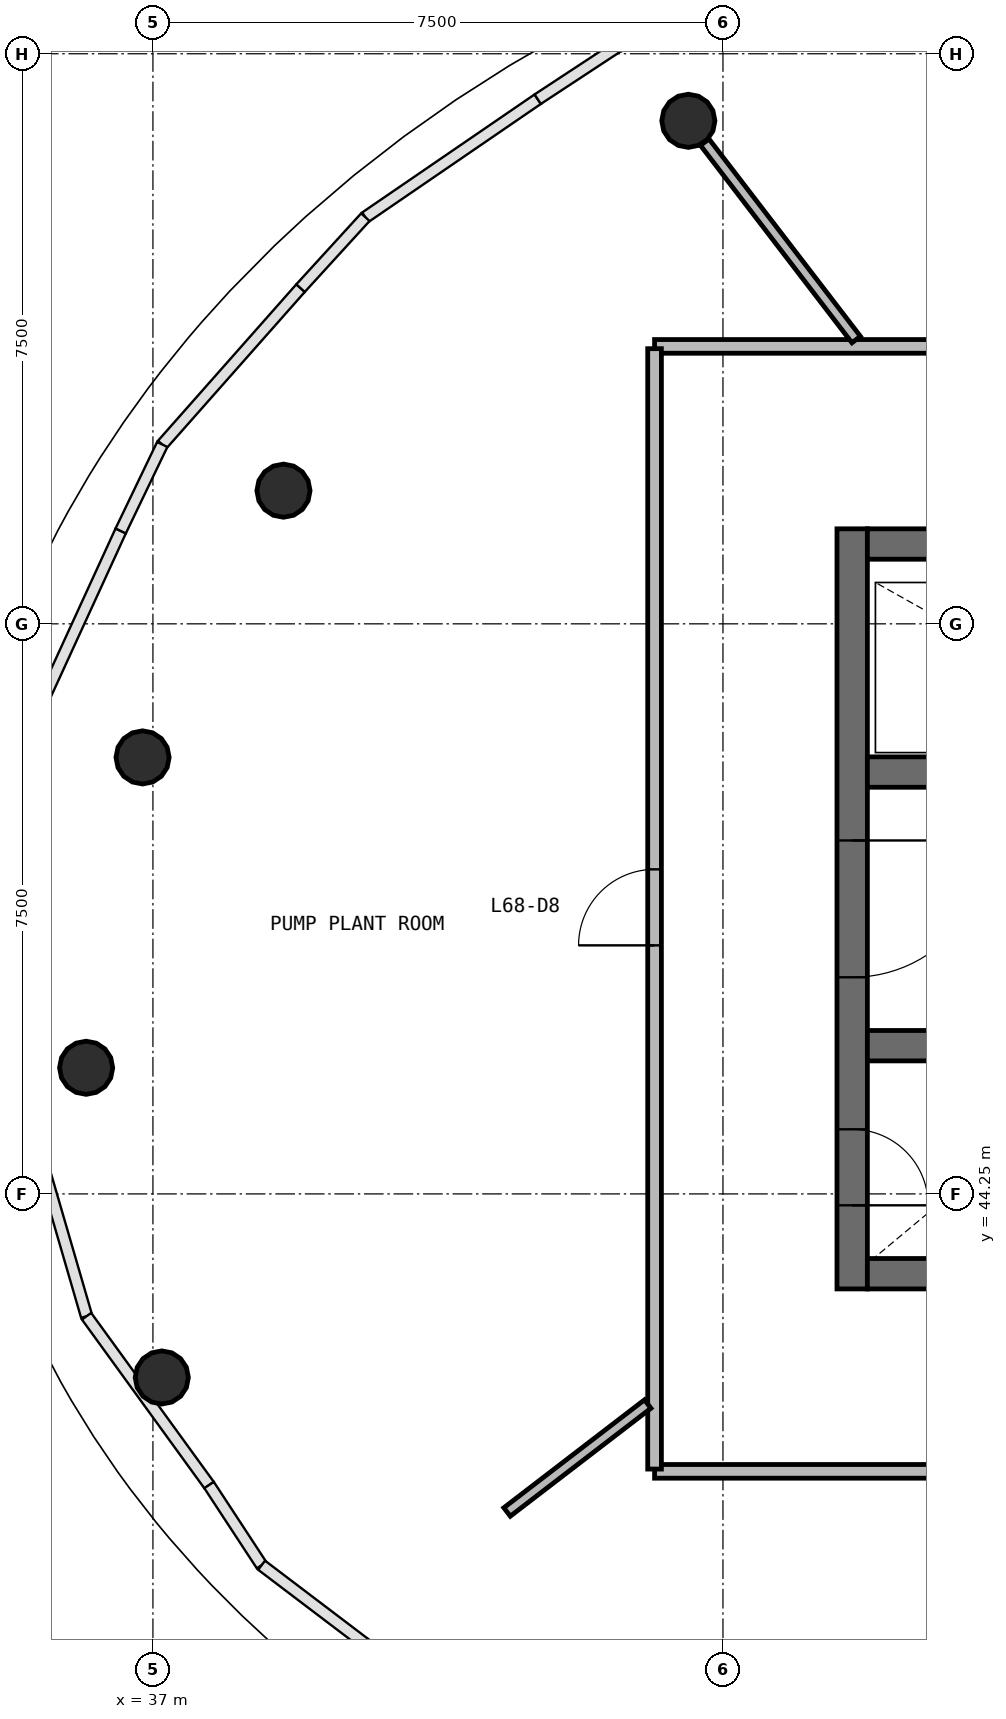
"""IFC4 building model, lengths in metres.
Left out: names, types, materials, properties, quantities, classifications, styles, units other than length and angle.
Written with IfcOpenShell. Run it as: python <this file> out.ifc"""

import sys

from ifc_helpers import new_model, si_unit, direction, frame, frame_2d, origin, origin_2d, place, context, subcontext, project, spatial, rectangle, circle, extrude, source, transform, mapped, element, fill, save


model = new_model("IFC4")
c1 = context("Model", 3, precision=1e-05, world=origin(), true_north=direction((0.0, 1.0)))
c2 = subcontext(c1, "Body", "Model", "MODEL_VIEW")
j1 = project(units=[si_unit("LENGTHUNIT", "METRE"), si_unit("PLANEANGLEUNIT", "RADIAN")], contexts=[c1])
p1 = place(None, origin())
s1 = spatial("IfcSite", under=j1, at=p1, CompositionType="ELEMENT")
p2 = place(p1, origin())
s2 = spatial("IfcBuilding", under=s1, at=p2, CompositionType="ELEMENT")
p3 = place(p2, frame((0.0, 0.0, 276.6)))
s3 = spatial("IfcBuildingStorey", under=s2, at=p3, CompositionType="ELEMENT", Elevation=276.6)
p4 = place(p3, frame((46.2, 53.0, 0.0), z_axis=(0.0, 0.0, 1.0), x_axis=(0.0, -1.0, 0.0)))
e1 = element("IfcWall", 1, at=p4, inside=s3, PredefinedType="SHEAR", context=c2, shape_type="SweptSolid", body=[
    extrude(rectangle(XDim=10.0, YDim=0.4, at=frame_2d((5.0, 0.0))), origin(), (0.0, 0.0, 1.0), 3.5),
])
p5 = place(p4, frame((4.1, 0.0, 0.0)))
e2 = element("IfcOpeningElement", 2, at=p5, cuts=e1, PredefinedType="OPENING", context=c2, shape_type="SweptSolid", body=[
    extrude(rectangle(XDim=1.8, YDim=2.1, at=frame_2d((0.9, 1.05))), frame((0.0, 0.21, 0.0), z_axis=(0.0, -1.0, 0.0), x_axis=(1.0, 0.0, 0.0)), (0.0, 0.0, 1.0), 0.42),
])
p6 = place(p4, frame((7.9, 0.0, 0.0)))
e3 = element("IfcOpeningElement", 3, at=p6, cuts=e1, PredefinedType="OPENING", context=c2, shape_type="SweptSolid", body=[
    extrude(rectangle(XDim=1.0, YDim=2.1, at=frame_2d((0.5, 1.05))), frame((0.0, 0.21, 0.0), z_axis=(0.0, -1.0, 0.0), x_axis=(1.0, 0.0, 0.0)), (0.0, 0.0, 1.0), 0.42),
])
p7 = place(p3, frame((46.4, 43.2, 0.0), z_axis=(0.0, 0.0, 1.0), x_axis=(1.0, 0.0, 0.0)))
e4 = element("IfcWall", 4, at=p7, inside=s3, PredefinedType="SHEAR", context=c2, shape_type="SweptSolid", body=[
    extrude(rectangle(XDim=11.2, YDim=0.4, at=frame_2d((5.6, 0.0))), origin(), (0.0, 0.0, 1.0), 3.5),
])
p8 = place(p3, frame((57.6, 52.8, 0.0), z_axis=(0.0, 0.0, 1.0), x_axis=(-1.0, 0.0, 0.0)))
e5 = element("IfcWall", 5, at=p8, inside=s3, PredefinedType="SHEAR", context=c2, shape_type="SweptSolid", body=[
    extrude(rectangle(XDim=11.2, YDim=0.4, at=frame_2d((5.6, 0.0))), origin(), (0.0, 0.0, 1.0), 3.5),
])
p9 = place(p8, frame((6.1, 0.0, 0.0)))
e6 = element("IfcOpeningElement", 6, at=p9, cuts=e5, PredefinedType="OPENING", context=c2, shape_type="SweptSolid", body=[
    extrude(rectangle(XDim=1.0, YDim=2.1, at=frame_2d((0.5, 1.05))), frame((0.0, 0.21, 0.0), z_axis=(0.0, -1.0, 0.0), x_axis=(1.0, 0.0, 0.0)), (0.0, 0.0, 1.0), 0.42),
])
p10 = place(p3, frame((46.4, 49.8, 0.0), z_axis=(0.0, 0.0, 1.0), x_axis=(1.0, 0.0, 0.0)))
e7 = element("IfcWall", 7, at=p10, inside=s3, PredefinedType="SHEAR", context=c2, shape_type="SweptSolid", body=[
    extrude(rectangle(XDim=11.2, YDim=0.4, at=frame_2d((5.6, 0.0))), origin(), (0.0, 0.0, 1.0), 3.5),
])
p11 = place(p10, frame((8.95, 0.0, 0.0)))
e8 = element("IfcOpeningElement", 8, at=p11, cuts=e7, PredefinedType="OPENING", context=c2, shape_type="SweptSolid", body=[
    extrude(rectangle(XDim=1.1, YDim=2.1, at=frame_2d((0.55, 1.05))), frame((0.0, 0.21, 0.0), z_axis=(0.0, -1.0, 0.0), x_axis=(1.0, 0.0, 0.0)), (0.0, 0.0, 1.0), 0.42),
])
p12 = place(p10, frame((5.65, 0.0, 0.0)))
e9 = element("IfcOpeningElement", 9, at=p12, cuts=e7, PredefinedType="OPENING", context=c2, shape_type="SweptSolid", body=[
    extrude(rectangle(XDim=0.9, YDim=2.1, at=frame_2d((0.45, 1.05))), frame((0.0, 0.21, 0.0), z_axis=(0.0, -1.0, 0.0), x_axis=(1.0, 0.0, 0.0)), (0.0, 0.0, 1.0), 0.42),
])
p13 = place(p3, frame((46.4, 46.2, 0.0), z_axis=(0.0, 0.0, 1.0), x_axis=(1.0, 0.0, 0.0)))
e10 = element("IfcWall", 10, at=p13, inside=s3, PredefinedType="SHEAR", context=c2, shape_type="SweptSolid", body=[
    extrude(rectangle(XDim=11.2, YDim=0.4, at=frame_2d((5.6, 0.0))), origin(), (0.0, 0.0, 1.0), 3.5),
])
p14 = place(p13, frame((5.65, 0.0, 0.0)))
e11 = element("IfcOpeningElement", 11, at=p14, cuts=e10, PredefinedType="OPENING", context=c2, shape_type="SweptSolid", body=[
    extrude(rectangle(XDim=0.9, YDim=2.1, at=frame_2d((0.45, 1.05))), frame((0.0, 0.21, 0.0), z_axis=(0.0, -1.0, 0.0), x_axis=(1.0, 0.0, 0.0)), (0.0, 0.0, 1.0), 0.42),
])
m1 = source(origin(), c2, "Body", "SweptSolid", [
    extrude(circle(Radius=0.35, at=origin_2d()), origin(), (0.0, 0.0, 1.0), 3.747),
])
p15 = place(p3, frame((47.086, 59.863, 0.128), z_axis=(0.136577604612, -0.329715018769, 0.934149112464), x_axis=(0.923874408562, 0.38269580244, 0.0)))
e12 = element("IfcColumn", 12, at=p15, inside=s3, PredefinedType="COLUMN", context=c2, shape_type="MappedRepresentation", body=[
    mapped(m1, transform((0.0, 0.0, 0.0), scale=1.0)),
])
m2 = source(origin(), c2, "Body", "SweptSolid", [
    extrude(circle(Radius=0.35, at=origin_2d()), origin(), (0.0, 0.0, 1.0), 3.739),
])
p16 = place(p3, frame((44.044, 58.368, 0.126), z_axis=(0.21405361087, -0.278961874812, 0.936141722217), x_axis=(0.793355214176, 0.608758986907, 0.0)))
e13 = element("IfcColumn", 13, at=p16, inside=s3, PredefinedType="COLUMN", context=c2, shape_type="MappedRepresentation", body=[
    mapped(m2, transform((0.0, 0.0, 0.0), scale=1.0)),
])
m3 = source(origin(), c2, "Body", "SweptSolid", [
    extrude(circle(Radius=0.35, at=origin_2d()), origin(), (0.0, 0.0, 1.0), 3.807),
])
p17 = place(p3, frame((38.718, 53.502, 0.141), z_axis=(0.363645996148, -0.150626775693, 0.919278610613), x_axis=(0.382682721486, 0.923879826967, 0.0)))
e14 = element("IfcColumn", 14, at=p17, inside=s3, PredefinedType="COLUMN", context=c2, shape_type="MappedRepresentation", body=[
    mapped(m3, transform((0.0, 0.0, 0.0), scale=1.0)),
])
m4 = source(origin(), c2, "Body", "SweptSolid", [
    extrude(circle(Radius=0.35, at=origin_2d()), origin(), (0.0, 0.0, 1.0), 3.898),
])
p18 = place(p3, frame((36.864, 49.993, 0.157), z_axis=(0.436578084577, -0.057429651923, 0.897831504876), x_axis=(0.130421400619, 0.991458651816, 0.0)))
e15 = element("IfcColumn", 15, at=p18, inside=s3, PredefinedType="COLUMN", context=c2, shape_type="MappedRepresentation", body=[
    mapped(m4, transform((0.0, 0.0, 0.0), scale=1.0)),
])
m5 = source(origin(), c2, "Body", "SweptSolid", [
    extrude(circle(Radius=0.35, at=origin_2d()), origin(), (0.0, 0.0, 1.0), 4.014),
])
p19 = place(p3, frame((36.121, 45.909, 0.174), z_axis=(0.48560488086, 0.063916184068, 0.871838643958), x_axis=(-0.13049626669, 0.991448800685, 0.0)))
e16 = element("IfcColumn", 16, at=p19, inside=s3, PredefinedType="COLUMN", context=c2, shape_type="MappedRepresentation", body=[
    mapped(m5, transform((0.0, 0.0, 0.0), scale=1.0)),
])
m6 = source(origin(), c2, "Body", "SweptSolid", [
    extrude(circle(Radius=0.35, at=origin_2d()), origin(), (0.0, 0.0, 1.0), 4.07),
])
p20 = place(p3, frame((37.117, 41.835, 0.181), z_axis=(0.471365631204, 0.195217483001, 0.86006079788), x_axis=(-0.382635660379, 0.923899318869, 0.0)))
e17 = element("IfcColumn", 17, at=p20, inside=s3, PredefinedType="COLUMN", context=c2, shape_type="MappedRepresentation", body=[
    mapped(m6, transform((0.0, 0.0, 0.0), scale=1.0)),
])
p21 = place(p3, frame((43.6, 55.4, 0.0), z_axis=(0.0, 0.0, 1.0), x_axis=(1.0, 0.0, 0.0)))
e18 = element("IfcWall", 18, at=p21, inside=s3, PredefinedType="PARTITIONING", context=c2, shape_type="SweptSolid", body=[
    extrude(rectangle(XDim=16.8, YDim=0.18, at=frame_2d((8.4, 0.0))), origin(), (0.0, 0.0, 1.0), 2.62),
])
p22 = place(p21, frame((7.95, 0.0, 0.0)))
e19 = element("IfcOpeningElement", 19, at=p22, cuts=e18, PredefinedType="OPENING", context=c2, shape_type="SweptSolid", body=[
    extrude(rectangle(XDim=1.0, YDim=2.1, at=frame_2d((0.5, 1.05))), frame((0.0, 0.1, 0.0), z_axis=(0.0, -1.0, 0.0), x_axis=(1.0, 0.0, 0.0)), (0.0, 0.0, 1.0), 0.2),
])
p23 = place(p3, frame((60.4, 40.6, 0.0), z_axis=(0.0, 0.0, 1.0), x_axis=(-1.0, 0.0, 0.0)))
e20 = element("IfcWall", 20, at=p23, inside=s3, PredefinedType="PARTITIONING", context=c2, shape_type="SweptSolid", body=[
    extrude(rectangle(XDim=16.8, YDim=0.18, at=frame_2d((8.4, 0.0))), origin(), (0.0, 0.0, 1.0), 2.62),
])
p24 = place(p23, frame((7.95, 0.0, 0.0)))
e21 = element("IfcOpeningElement", 21, at=p24, cuts=e20, PredefinedType="OPENING", context=c2, shape_type="SweptSolid", body=[
    extrude(rectangle(XDim=1.0, YDim=2.1, at=frame_2d((0.5, 1.05))), frame((0.0, 0.1, 0.0), z_axis=(0.0, -1.0, 0.0), x_axis=(1.0, 0.0, 0.0)), (0.0, 0.0, 1.0), 0.2),
])
p25 = place(p3, frame((43.6, 40.63, 0.0), z_axis=(0.0, 0.0, 1.0), x_axis=(0.0, 1.0, 0.0)))
e22 = element("IfcWall", 22, at=p25, inside=s3, PredefinedType="PARTITIONING", context=c2, shape_type="SweptSolid", body=[
    extrude(rectangle(XDim=14.74, YDim=0.18, at=frame_2d((7.37, 0.0))), origin(), (0.0, 0.0, 1.0), 2.62),
])
p26 = place(p25, frame((6.89, 0.0, 0.0)))
e23 = element("IfcOpeningElement", 23, at=p26, cuts=e22, PredefinedType="OPENING", context=c2, shape_type="SweptSolid", body=[
    extrude(rectangle(XDim=1.0, YDim=2.1, at=frame_2d((0.5, 1.05))), frame((0.0, 0.1, 0.0), z_axis=(0.0, -1.0, 0.0), x_axis=(1.0, 0.0, 0.0)), (0.0, 0.0, 1.0), 0.2),
])
p27 = place(p3, frame((43.51, 41.485, 0.0), z_axis=(0.0, 0.0, 1.0), x_axis=(-0.793370454613, -0.608739124542, 0.0)))
e24 = element("IfcWall", 24, at=p27, inside=s3, PredefinedType="PARTITIONING", context=c2, shape_type="SweptSolid", body=[
    extrude(rectangle(XDim=2.333, YDim=0.14, at=frame_2d((1.166, 0.0))), origin(), (0.0, 0.0, 1.0), 2.62),
])
p28 = place(p3, frame((46.253, 55.49, 0.0), z_axis=(0.0, 0.0, 1.0), x_axis=(-0.608736894437, 0.793372165728, 0.0)))
e25 = element("IfcWall", 25, at=p28, inside=s3, PredefinedType="PARTITIONING", context=c2, shape_type="SweptSolid", body=[
    extrude(rectangle(XDim=3.273, YDim=0.14, at=frame_2d((1.636, 0.0))), origin(), (0.0, 0.0, 1.0), 2.62),
])
m7 = source(origin(), c2, "Body", "SweptSolid", [
    extrude(rectangle(XDim=1.8, YDim=2.1, at=frame_2d((0.9, 1.05))), frame((0.0, 0.025, 0.0), z_axis=(0.0, -1.0, 0.0), x_axis=(1.0, 0.0, 0.0)), (0.0, 0.0, 1.0), 0.05),
])
p29 = place(p5, origin())
e26 = element("IfcDoor", 26, at=p29, inside=s3, OperationType="SINGLE_SWING_LEFT", PredefinedType="DOOR", context=c2, shape_type="MappedRepresentation", body=[
    mapped(m7, transform((0.0, 0.0, 0.0), scale=1.0)),
])
fill(e2, e26)
m8 = source(origin(), c2, "Body", "SweptSolid", [
    extrude(rectangle(XDim=1.0, YDim=2.1, at=frame_2d((0.5, 1.05))), frame((0.0, 0.025, 0.0), z_axis=(0.0, -1.0, 0.0), x_axis=(1.0, 0.0, 0.0)), (0.0, 0.0, 1.0), 0.05),
])
p30 = place(p6, origin())
e27 = element("IfcDoor", 27, at=p30, inside=s3, OperationType="SINGLE_SWING_RIGHT", PredefinedType="DOOR", context=c2, shape_type="MappedRepresentation", body=[
    mapped(m8, transform((0.0, 0.0, 0.0), scale=1.0)),
])
fill(e3, e27)
m9 = source(origin(), c2, "Body", "SweptSolid", [
    extrude(rectangle(XDim=1.0, YDim=2.1, at=frame_2d((0.5, 1.05))), frame((0.0, 0.025, 0.0), z_axis=(0.0, -1.0, 0.0), x_axis=(1.0, 0.0, 0.0)), (0.0, 0.0, 1.0), 0.05),
])
p31 = place(p26, origin())
e28 = element("IfcDoor", 28, at=p31, inside=s3, OperationType="SINGLE_SWING_LEFT", PredefinedType="DOOR", context=c2, shape_type="MappedRepresentation", body=[
    mapped(m9, transform((0.0, 0.0, 0.0), scale=1.0)),
])
fill(e23, e28)
save(model, sys.argv[1])
